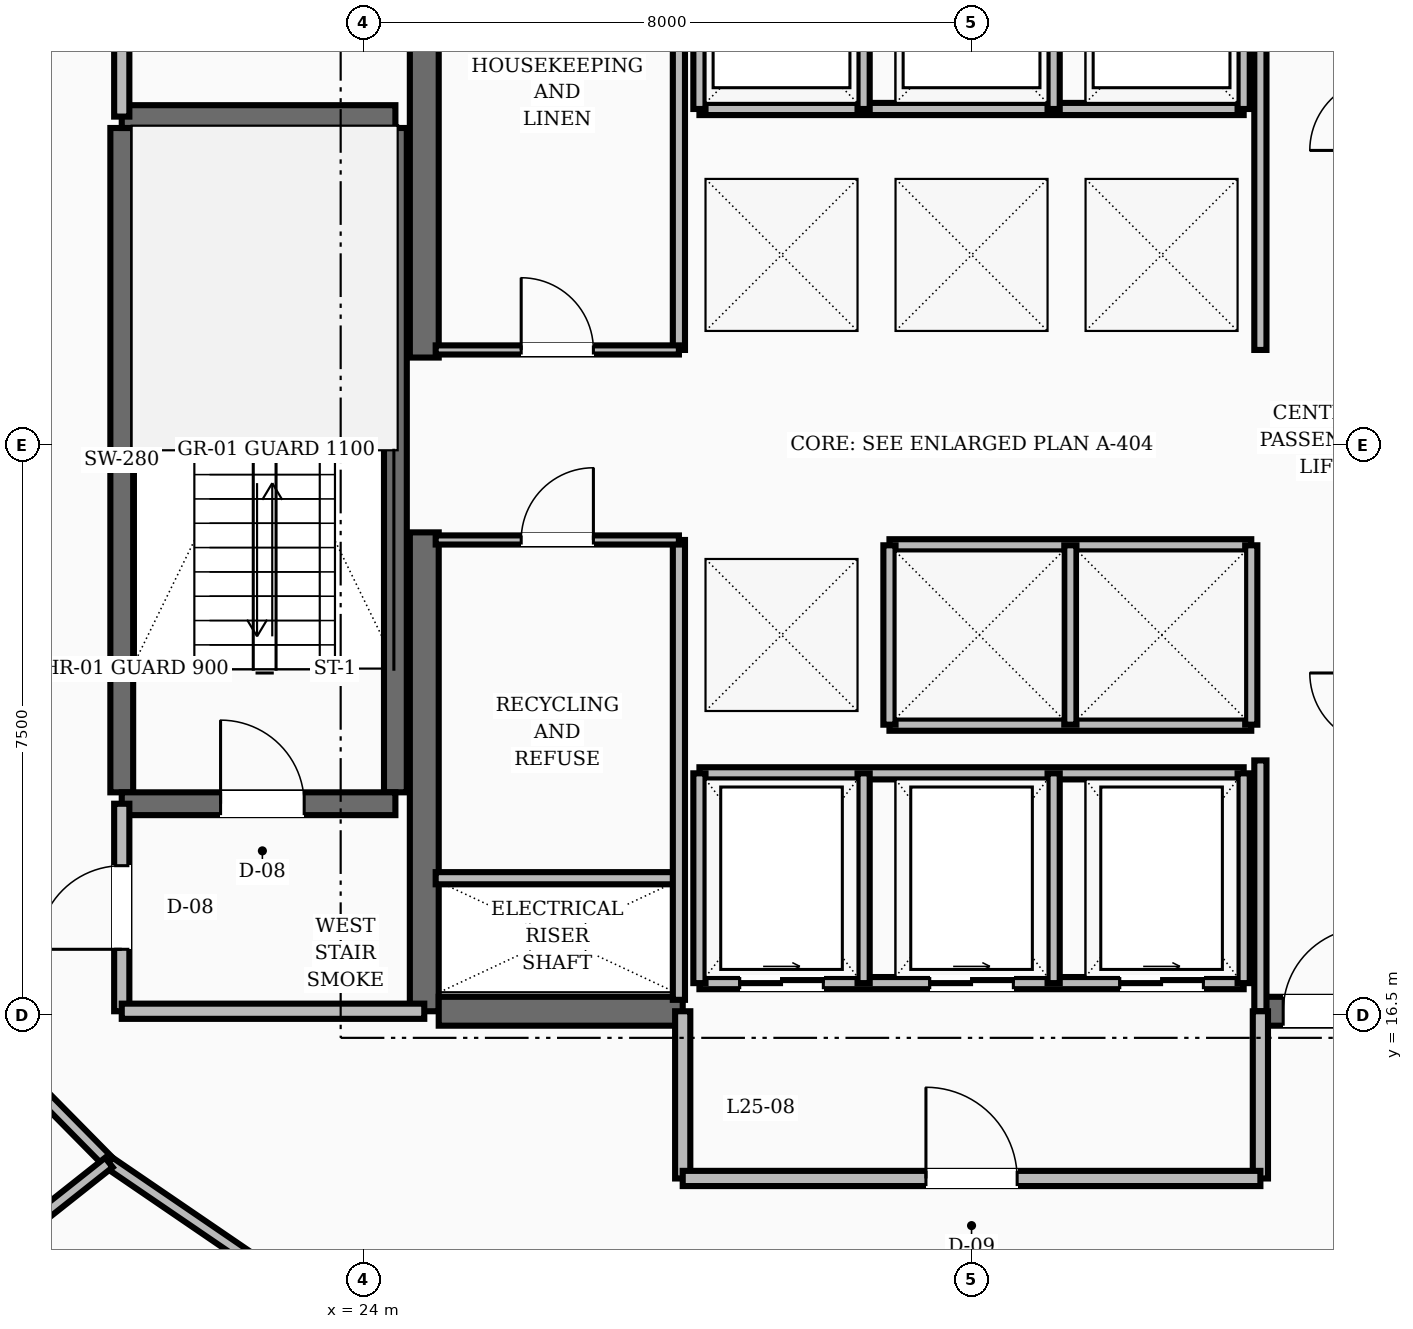
"""IFC4 building model, lengths in metres.
Left out: names, types, materials, properties, quantities, classifications, styles, units other than length and angle.
Written with IfcOpenShell. Run it as: python <this file> out.ifc"""

import sys

from ifc_helpers import new_model, si_unit, direction, frame, frame_2d, origin, place, context, subcontext, project, spatial, rectangle, extrude, element, fill, save


model = new_model("IFC4")
c1 = context("Model", 3, precision=1e-05, world=origin(), true_north=direction((0.0, 1.0)))
c2 = subcontext(c1, "Body", "Model", "MODEL_VIEW")
j1 = project(units=[si_unit("LENGTHUNIT", "METRE"), si_unit("PLANEANGLEUNIT", "RADIAN")], contexts=[c1])
p1 = place(None, origin())
s1 = spatial("IfcSite", under=j1, at=p1, CompositionType="ELEMENT")
p2 = place(p1, origin())
s2 = spatial("IfcBuilding", under=s1, at=p2, CompositionType="ELEMENT")
p3 = place(p2, frame((0.0, 0.0, 98.8)))
s3 = spatial("IfcBuildingStorey", under=s2, at=p3, CompositionType="ELEMENT", Elevation=98.8)
for number, where, z_axis, x_axis in (
    (1, (24.8, 16.55, 0.0), (0.0, 0.0, 1.0), (0.0, 1.0, 0.0)),
    (2, (24.8, 25.15, 0.0), (0.0, 0.0, 1.0), (0.0, 1.0, 0.0)),
):
    element("IfcWall", number, at=place(p3, frame(where, z_axis=z_axis, x_axis=x_axis)), inside=s3, PredefinedType="SHEAR", context=c2, shape_type="SweptSolid", body=[
        extrude(rectangle(XDim=6.3, YDim=0.38, at=frame_2d((3.15, 0.0))), origin(), (0.0, 0.0, 1.0), 3.6),
    ])
p4 = place(p3, frame((24.99, 16.55, 0.0), z_axis=(0.0, 0.0, 1.0), x_axis=(1.0, 0.0, 0.0)))
e3 = element("IfcWall", 3, at=p4, inside=s3, PredefinedType="SHEAR", context=c2, shape_type="SweptSolid", body=[
    extrude(rectangle(XDim=3.21, YDim=0.38, at=frame_2d((1.605, 0.0))), origin(), (0.0, 0.0, 1.0), 3.6),
])
p5 = place(p3, frame((35.8, 16.55, 0.0), z_axis=(0.0, 0.0, 1.0), x_axis=(1.0, 0.0, 0.0)))
e4 = element("IfcWall", 4, at=p5, inside=s3, PredefinedType="SHEAR", context=c2, shape_type="SweptSolid", body=[
    extrude(rectangle(XDim=3.21, YDim=0.38, at=frame_2d((1.605, 0.0))), origin(), (0.0, 0.0, 1.0), 3.6),
])
p6 = place(p5, frame((0.3, 0.0, 0.0)))
e5 = element("IfcOpeningElement", 5, at=p6, cuts=e4, PredefinedType="OPENING", context=c2, shape_type="SweptSolid", body=[
    extrude(rectangle(XDim=1.1, YDim=2.1, at=frame_2d((0.55, 1.05))), frame((0.0, 0.2, 0.0), z_axis=(0.0, -1.0, 0.0), x_axis=(1.0, 0.0, 0.0)), (0.0, 0.0, 1.0), 0.4),
])
for number, where, z_axis, x_axis in (
    (6, (20.82, 19.43, 0.0), (0.0, 0.0, 1.0), (0.0, 1.0, 0.0)),
    (7, (24.42, 19.43, 0.0), (0.0, 0.0, 1.0), (0.0, 1.0, 0.0)),
):
    element("IfcWall", number, at=place(p3, frame(where, z_axis=z_axis, x_axis=x_axis)), inside=s3, PredefinedType="SHEAR", context=c2, shape_type="SweptSolid", body=[
        extrude(rectangle(XDim=8.74, YDim=0.3, at=frame_2d((4.37, 0.0))), origin(), (0.0, 0.0, 1.0), 3.6),
    ])
p7 = place(p3, frame((20.82, 19.28, 0.0), z_axis=(0.0, 0.0, 1.0), x_axis=(1.0, 0.0, 0.0)))
e8 = element("IfcWall", 8, at=p7, inside=s3, PredefinedType="SHEAR", context=c2, shape_type="SweptSolid", body=[
    extrude(rectangle(XDim=3.6, YDim=0.3, at=frame_2d((1.8, 0.0))), origin(), (0.0, 0.0, 1.0), 3.6),
])
p8 = place(p7, frame((1.3, 0.0, 0.0)))
e9 = element("IfcOpeningElement", 9, at=p8, cuts=e8, PredefinedType="OPENING", context=c2, shape_type="SweptSolid", body=[
    extrude(rectangle(XDim=1.1, YDim=2.1, at=frame_2d((0.55, 1.05))), frame((0.0, 0.16, 0.0), z_axis=(0.0, -1.0, 0.0), x_axis=(1.0, 0.0, 0.0)), (0.0, 0.0, 1.0), 0.32),
])
p9 = place(p3, frame((20.82, 28.32, 0.0), z_axis=(0.0, 0.0, 1.0), x_axis=(1.0, 0.0, 0.0)))
e10 = element("IfcWall", 10, at=p9, inside=s3, PredefinedType="SHEAR", context=c2, shape_type="SweptSolid", body=[
    extrude(rectangle(XDim=3.6, YDim=0.3, at=frame_2d((1.8, 0.0))), origin(), (0.0, 0.0, 1.0), 3.6),
])
p10 = place(p3, frame((20.82, 16.55, 0.0), z_axis=(0.0, 0.0, 1.0), x_axis=(0.0, 1.0, 0.0)))
e11 = element("IfcWall", 11, at=p10, inside=s3, PredefinedType="SOLIDWALL", context=c2, shape_type="SweptSolid", body=[
    extrude(rectangle(XDim=2.73, YDim=0.2, at=frame_2d((1.365, 0.0))), origin(), (0.0, 0.0, 1.0), 2.71),
])
p11 = place(p10, frame((0.815, 0.0, 0.0)))
e12 = element("IfcOpeningElement", 12, at=p11, cuts=e11, PredefinedType="OPENING", context=c2, shape_type="SweptSolid", body=[
    extrude(rectangle(XDim=1.1, YDim=2.1, at=frame_2d((0.55, 1.05))), frame((0.0, 0.11, 0.0), z_axis=(0.0, -1.0, 0.0), x_axis=(1.0, 0.0, 0.0)), (0.0, 0.0, 1.0), 0.22),
])
p12 = place(p3, frame((20.82, 16.55, 0.0), z_axis=(0.0, 0.0, 1.0), x_axis=(1.0, 0.0, 0.0)))
e13 = element("IfcWall", 13, at=p12, inside=s3, PredefinedType="SOLIDWALL", context=c2, shape_type="SweptSolid", body=[
    extrude(rectangle(XDim=3.98, YDim=0.2, at=frame_2d((1.99, 0.0))), origin(), (0.0, 0.0, 1.0), 2.71),
])
p13 = place(p3, frame((20.82, 28.32, 0.0), z_axis=(0.0, 0.0, 1.0), x_axis=(0.0, 1.0, 0.0)))
e14 = element("IfcWall", 14, at=p13, inside=s3, PredefinedType="SOLIDWALL", context=c2, shape_type="SweptSolid", body=[
    extrude(rectangle(XDim=3.13, YDim=0.2, at=frame_2d((1.565, 0.0))), origin(), (0.0, 0.0, 1.0), 2.71),
])
p14 = place(p13, frame((1.09, 0.0, 0.0)))
e15 = element("IfcOpeningElement", 15, at=p14, cuts=e14, PredefinedType="OPENING", context=c2, shape_type="SweptSolid", body=[
    extrude(rectangle(XDim=0.95, YDim=2.1, at=frame_2d((0.475, 1.05))), frame((0.0, 0.11, 0.0), z_axis=(0.0, -1.0, 0.0), x_axis=(1.0, 0.0, 0.0)), (0.0, 0.0, 1.0), 0.22),
])
p15 = place(p3, frame((35.8, 16.55, 0.0), z_axis=(0.0, 0.0, 1.0), x_axis=(0.0, 1.0, 0.0)))
e16 = element("IfcWall", 16, at=p15, inside=s3, PredefinedType="SOLIDWALL", context=c2, shape_type="SweptSolid", body=[
    extrude(rectangle(XDim=3.3, YDim=0.16, at=frame_2d((1.65, 0.0))), origin(), (0.0, 0.0, 1.0), 2.71),
])
p16 = place(p3, frame((35.8, 25.25, 0.0), z_axis=(0.0, 0.0, 1.0), x_axis=(0.0, 1.0, 0.0)))
e17 = element("IfcWall", 17, at=p16, inside=s3, PredefinedType="SOLIDWALL", context=c2, shape_type="SweptSolid", body=[
    extrude(rectangle(XDim=6.2, YDim=0.16, at=frame_2d((3.1, 0.0))), origin(), (0.0, 0.0, 1.0), 2.71),
])
for number, where, z_axis, x_axis in (
    (18, (28.2, 14.35, 0.0), (0.0, 0.0, 1.0), (0.0, 1.0, 0.0)),
    (19, (35.8, 14.35, 0.0), (0.0, 0.0, 1.0), (0.0, 1.0, 0.0)),
):
    element("IfcWall", number, at=place(p3, frame(where, z_axis=z_axis, x_axis=x_axis)), inside=s3, PredefinedType="SOLIDWALL", context=c2, shape_type="SweptSolid", body=[
        extrude(rectangle(XDim=2.2, YDim=0.2, at=frame_2d((1.1, 0.0))), origin(), (0.0, 0.0, 1.0), 2.71),
    ])
p17 = place(p3, frame((28.2, 14.35, 0.0), z_axis=(0.0, 0.0, 1.0), x_axis=(1.0, 0.0, 0.0)))
e20 = element("IfcWall", 20, at=p17, inside=s3, PredefinedType="SOLIDWALL", context=c2, shape_type="SweptSolid", body=[
    extrude(rectangle(XDim=7.6, YDim=0.2, at=frame_2d((3.8, 0.0))), origin(), (0.0, 0.0, 1.0), 2.71),
])
p18 = place(p17, frame((3.2, 0.0, 0.0)))
e21 = element("IfcOpeningElement", 21, at=p18, cuts=e20, PredefinedType="OPENING", context=c2, shape_type="SweptSolid", body=[
    extrude(rectangle(XDim=1.2, YDim=2.1, at=frame_2d((0.6, 1.05))), frame((0.0, 0.11, 0.0), z_axis=(0.0, -1.0, 0.0), x_axis=(1.0, 0.0, 0.0)), (0.0, 0.0, 1.0), 0.22),
])
p19 = place(p3, frame((28.42, 28.42, 0.0), z_axis=(0.0, 0.0, 1.0), x_axis=(1.0, 0.0, 0.0)))
e22 = element("IfcWall", 22, at=p19, inside=s3, PredefinedType="SOLIDWALL", context=c2, shape_type="SweptSolid", body=[
    extrude(rectangle(XDim=7.16, YDim=0.16, at=frame_2d((3.58, 0.0))), origin(), (0.0, 0.0, 1.0), 2.71),
])
for number, where, z_axis, x_axis in (
    (23, (28.42, 28.42, 0.0), (0.0, 0.0, 1.0), (0.0, 1.0, 0.0)),
    (24, (30.58, 28.42, 0.0), (0.0, 0.0, 1.0), (0.0, 1.0, 0.0)),
    (25, (33.08, 28.42, 0.0), (0.0, 0.0, 1.0), (0.0, 1.0, 0.0)),
    (26, (35.58, 28.42, 0.0), (0.0, 0.0, 1.0), (0.0, 1.0, 0.0)),
):
    element("IfcWall", number, at=place(p3, frame(where, z_axis=z_axis, x_axis=x_axis)), inside=s3, PredefinedType="SOLIDWALL", context=c2, shape_type="SweptSolid", body=[
        extrude(rectangle(XDim=2.16, YDim=0.16, at=frame_2d((1.08, 0.0))), origin(), (0.0, 0.0, 1.0), 2.71),
    ])
for number, where, z_axis, x_axis in (
    (27, (30.92, 22.68, 0.0), (0.0, 0.0, 1.0), (1.0, 0.0, 0.0)),
    (28, (30.92, 20.32, 0.0), (0.0, 0.0, 1.0), (1.0, 0.0, 0.0)),
):
    element("IfcWall", number, at=place(p3, frame(where, z_axis=z_axis, x_axis=x_axis)), inside=s3, PredefinedType="SOLIDWALL", context=c2, shape_type="SweptSolid", body=[
        extrude(rectangle(XDim=4.76, YDim=0.16, at=frame_2d((2.38, 0.0))), origin(), (0.0, 0.0, 1.0), 2.71),
    ])
for number, where, z_axis, x_axis in (
    (29, (30.92, 20.32, 0.0), (0.0, 0.0, 1.0), (0.0, 1.0, 0.0)),
    (30, (33.3, 20.32, 0.0), (0.0, 0.0, 1.0), (0.0, 1.0, 0.0)),
    (31, (35.68, 20.32, 0.0), (0.0, 0.0, 1.0), (0.0, 1.0, 0.0)),
):
    element("IfcWall", number, at=place(p3, frame(where, z_axis=z_axis, x_axis=x_axis)), inside=s3, PredefinedType="SOLIDWALL", context=c2, shape_type="SweptSolid", body=[
        extrude(rectangle(XDim=2.36, YDim=0.16, at=frame_2d((1.18, 0.0))), origin(), (0.0, 0.0, 1.0), 2.71),
    ])
p20 = place(p3, frame((28.42, 16.92, 0.0), z_axis=(0.0, 0.0, 1.0), x_axis=(1.0, 0.0, 0.0)))
e32 = element("IfcWall", 32, at=p20, inside=s3, PredefinedType="SOLIDWALL", context=c2, shape_type="SweptSolid", body=[
    extrude(rectangle(XDim=7.16, YDim=0.16, at=frame_2d((3.58, 0.0))), origin(), (0.0, 0.0, 1.0), 2.71),
])
p21 = place(p20, frame((0.53, 0.0, 0.0)))
e33 = element("IfcOpeningElement", 33, at=p21, cuts=e32, PredefinedType="OPENING", context=c2, shape_type="SweptSolid", body=[
    extrude(rectangle(XDim=1.1, YDim=2.15, at=frame_2d((0.55, 1.075))), frame((0.0, 0.09, 0.0), z_axis=(0.0, -1.0, 0.0), x_axis=(1.0, 0.0, 0.0)), (0.0, 0.0, 1.0), 0.18),
])
p22 = place(p20, frame((3.03, 0.0, 0.0)))
e34 = element("IfcOpeningElement", 34, at=p22, cuts=e32, PredefinedType="OPENING", context=c2, shape_type="SweptSolid", body=[
    extrude(rectangle(XDim=1.1, YDim=2.15, at=frame_2d((0.55, 1.075))), frame((0.0, 0.09, 0.0), z_axis=(0.0, -1.0, 0.0), x_axis=(1.0, 0.0, 0.0)), (0.0, 0.0, 1.0), 0.18),
])
p23 = place(p20, frame((5.53, 0.0, 0.0)))
e35 = element("IfcOpeningElement", 35, at=p23, cuts=e32, PredefinedType="OPENING", context=c2, shape_type="SweptSolid", body=[
    extrude(rectangle(XDim=1.1, YDim=2.15, at=frame_2d((0.55, 1.075))), frame((0.0, 0.09, 0.0), z_axis=(0.0, -1.0, 0.0), x_axis=(1.0, 0.0, 0.0)), (0.0, 0.0, 1.0), 0.18),
])
p24 = place(p3, frame((28.42, 19.68, 0.0), z_axis=(0.0, 0.0, 1.0), x_axis=(1.0, 0.0, 0.0)))
e36 = element("IfcWall", 36, at=p24, inside=s3, PredefinedType="SOLIDWALL", context=c2, shape_type="SweptSolid", body=[
    extrude(rectangle(XDim=7.16, YDim=0.16, at=frame_2d((3.58, 0.0))), origin(), (0.0, 0.0, 1.0), 2.71),
])
for number, where, z_axis, x_axis in (
    (37, (28.42, 16.92, 0.0), (0.0, 0.0, 1.0), (0.0, 1.0, 0.0)),
    (38, (30.58, 16.92, 0.0), (0.0, 0.0, 1.0), (0.0, 1.0, 0.0)),
    (39, (33.08, 16.92, 0.0), (0.0, 0.0, 1.0), (0.0, 1.0, 0.0)),
    (40, (35.58, 16.92, 0.0), (0.0, 0.0, 1.0), (0.0, 1.0, 0.0)),
):
    element("IfcWall", number, at=place(p3, frame(where, z_axis=z_axis, x_axis=x_axis)), inside=s3, PredefinedType="SOLIDWALL", context=c2, shape_type="SweptSolid", body=[
        extrude(rectangle(XDim=2.76, YDim=0.16, at=frame_2d((1.38, 0.0))), origin(), (0.0, 0.0, 1.0), 2.71),
    ])
p25 = place(p3, frame((24.95, 18.3, 0.0), z_axis=(0.0, 0.0, 1.0), x_axis=(1.0, 0.0, 0.0)))
e41 = element("IfcWall", 41, at=p25, inside=s3, PredefinedType="SOLIDWALL", context=c2, shape_type="SweptSolid", body=[
    extrude(rectangle(XDim=3.2, YDim=0.16, at=frame_2d((1.6, 0.0))), origin(), (0.0, 0.0, 1.0), 2.71),
])
p26 = place(p3, frame((28.15, 16.7, 0.0), z_axis=(0.0, 0.0, 1.0), x_axis=(0.0, 1.0, 0.0)))
e42 = element("IfcWall", 42, at=p26, inside=s3, PredefinedType="SOLIDWALL", context=c2, shape_type="SweptSolid", body=[
    extrude(rectangle(XDim=6.05, YDim=0.16, at=frame_2d((3.025, 0.0))), origin(), (0.0, 0.0, 1.0), 2.71),
])
p27 = place(p3, frame((28.15, 25.25, 0.0), z_axis=(0.0, 0.0, 1.0), x_axis=(0.0, 1.0, 0.0)))
e43 = element("IfcWall", 43, at=p27, inside=s3, PredefinedType="SOLIDWALL", context=c2, shape_type="SweptSolid", body=[
    extrude(rectangle(XDim=6.1, YDim=0.16, at=frame_2d((3.05, 0.0))), origin(), (0.0, 0.0, 1.0), 2.71),
])
p28 = place(p3, frame((24.95, 25.25, 0.0), z_axis=(0.0, 0.0, 1.0), x_axis=(1.0, 0.0, 0.0)))
e44 = element("IfcWall", 44, at=p28, inside=s3, PredefinedType="PARTITIONING", context=c2, shape_type="SweptSolid", body=[
    extrude(rectangle(XDim=3.2, YDim=0.12, at=frame_2d((1.6, 0.0))), origin(), (0.0, 0.0, 1.0), 2.71),
])
p29 = place(p28, frame((1.125, 0.0, 0.0)))
e45 = element("IfcOpeningElement", 45, at=p29, cuts=e44, PredefinedType="OPENING", context=c2, shape_type="SweptSolid", body=[
    extrude(rectangle(XDim=0.95, YDim=2.1, at=frame_2d((0.475, 1.05))), frame((0.0, 0.07, 0.0), z_axis=(0.0, -1.0, 0.0), x_axis=(1.0, 0.0, 0.0)), (0.0, 0.0, 1.0), 0.14),
])
p30 = place(p3, frame((24.95, 22.75, 0.0), z_axis=(0.0, 0.0, 1.0), x_axis=(1.0, 0.0, 0.0)))
e46 = element("IfcWall", 46, at=p30, inside=s3, PredefinedType="PARTITIONING", context=c2, shape_type="SweptSolid", body=[
    extrude(rectangle(XDim=3.2, YDim=0.12, at=frame_2d((1.6, 0.0))), origin(), (0.0, 0.0, 1.0), 2.71),
])
p31 = place(p30, frame((1.125, 0.0, 0.0)))
e47 = element("IfcOpeningElement", 47, at=p31, cuts=e46, PredefinedType="OPENING", context=c2, shape_type="SweptSolid", body=[
    extrude(rectangle(XDim=0.95, YDim=2.1, at=frame_2d((0.475, 1.05))), frame((0.0, 0.07, 0.0), z_axis=(0.0, -1.0, 0.0), x_axis=(1.0, 0.0, 0.0)), (0.0, 0.0, 1.0), 0.14),
])
p32 = place(p3, frame((18.655, 16.583, 0.0), z_axis=(0.0, 0.0, 1.0), x_axis=(0.702366174226, -0.711815816981, 0.0)))
e48 = element("IfcWall", 48, at=p32, inside=s3, PredefinedType="SOLIDWALL", context=c2, shape_type="SweptSolid", body=[
    extrude(rectangle(XDim=2.842, YDim=0.16, at=frame_2d((1.421, 0.0))), origin(), (0.0, 0.0, 1.0), 2.71),
])
p33 = place(p3, frame((20.651, 14.56, 0.0), z_axis=(0.0, 0.0, 1.0), x_axis=(0.825929039072, -0.563774088104, 0.0)))
e49 = element("IfcWall", 49, at=p33, inside=s3, PredefinedType="SOLIDWALL", context=c2, shape_type="SweptSolid", body=[
    extrude(rectangle(XDim=2.945, YDim=0.16, at=frame_2d((1.472, 0.0))), origin(), (0.0, 0.0, 1.0), 2.71),
])
p34 = place(p3, frame((20.651, 14.56, 0.0), z_axis=(0.0, 0.0, 1.0), x_axis=(-0.783943059449, -0.620832730727, 0.0)))
e50 = element("IfcWall", 50, at=p34, inside=s3, PredefinedType="SOLIDWALL", context=c2, shape_type="SweptSolid", body=[
    extrude(rectangle(XDim=9.732, YDim=0.16, at=frame_2d((4.866, 0.0))), origin(), (0.0, 0.0, 1.0), 2.71),
])
p35 = place(p8, origin())
e51 = element("IfcDoor", 51, at=p35, inside=s3, OperationType="SINGLE_SWING_LEFT", PredefinedType="DOOR", context=c2, shape_type="SweptSolid", body=[
    extrude(rectangle(XDim=1.1, YDim=2.1, at=frame_2d((0.55, 1.05))), frame((0.0, 0.025, 0.0), z_axis=(0.0, -1.0, 0.0), x_axis=(1.0, 0.0, 0.0)), (0.0, 0.0, 1.0), 0.05),
])
fill(e9, e51)
p36 = place(p11, origin())
e52 = element("IfcDoor", 52, at=p36, inside=s3, OperationType="SINGLE_SWING_LEFT", PredefinedType="DOOR", context=c2, shape_type="SweptSolid", body=[
    extrude(rectangle(XDim=1.1, YDim=2.1, at=frame_2d((0.55, 1.05))), frame((0.0, 0.025, 0.0), z_axis=(0.0, -1.0, 0.0), x_axis=(1.0, 0.0, 0.0)), (0.0, 0.0, 1.0), 0.05),
])
fill(e12, e52)
p37 = place(p6, origin())
e53 = element("IfcDoor", 53, at=p37, inside=s3, OperationType="SINGLE_SWING_RIGHT", PredefinedType="DOOR", context=c2, shape_type="SweptSolid", body=[
    extrude(rectangle(XDim=1.1, YDim=2.1, at=frame_2d((0.55, 1.05))), frame((0.0, 0.025, 0.0), z_axis=(0.0, -1.0, 0.0), x_axis=(1.0, 0.0, 0.0)), (0.0, 0.0, 1.0), 0.05),
])
fill(e5, e53)
p38 = place(p18, origin())
e54 = element("IfcDoor", 54, at=p38, inside=s3, OperationType="SINGLE_SWING_LEFT", PredefinedType="DOOR", context=c2, shape_type="SweptSolid", body=[
    extrude(rectangle(XDim=1.2, YDim=2.1, at=frame_2d((0.6, 1.05))), frame((0.0, 0.025, 0.0), z_axis=(0.0, -1.0, 0.0), x_axis=(1.0, 0.0, 0.0)), (0.0, 0.0, 1.0), 0.05),
])
fill(e21, e54)
p39 = place(p21, origin())
e55 = element("IfcDoor", 55, at=p39, inside=s3, OperationType="SLIDING_TO_RIGHT", PredefinedType="DOOR", context=c2, shape_type="SweptSolid", body=[
    extrude(rectangle(XDim=1.1, YDim=2.15, at=frame_2d((0.55, 1.075))), frame((0.0, 0.025, 0.0), z_axis=(0.0, -1.0, 0.0), x_axis=(1.0, 0.0, 0.0)), (0.0, 0.0, 1.0), 0.05),
])
fill(e33, e55)
p40 = place(p22, origin())
e56 = element("IfcDoor", 56, at=p40, inside=s3, OperationType="SLIDING_TO_RIGHT", PredefinedType="DOOR", context=c2, shape_type="SweptSolid", body=[
    extrude(rectangle(XDim=1.1, YDim=2.15, at=frame_2d((0.55, 1.075))), frame((0.0, 0.025, 0.0), z_axis=(0.0, -1.0, 0.0), x_axis=(1.0, 0.0, 0.0)), (0.0, 0.0, 1.0), 0.05),
])
fill(e34, e56)
p41 = place(p23, origin())
e57 = element("IfcDoor", 57, at=p41, inside=s3, OperationType="SLIDING_TO_RIGHT", PredefinedType="DOOR", context=c2, shape_type="SweptSolid", body=[
    extrude(rectangle(XDim=1.1, YDim=2.15, at=frame_2d((0.55, 1.075))), frame((0.0, 0.025, 0.0), z_axis=(0.0, -1.0, 0.0), x_axis=(1.0, 0.0, 0.0)), (0.0, 0.0, 1.0), 0.05),
])
fill(e35, e57)
p42 = place(p29, origin())
e58 = element("IfcDoor", 58, at=p42, inside=s3, OperationType="SINGLE_SWING_LEFT", PredefinedType="DOOR", context=c2, shape_type="SweptSolid", body=[
    extrude(rectangle(XDim=0.95, YDim=2.1, at=frame_2d((0.475, 1.05))), frame((0.0, 0.025, 0.0), z_axis=(0.0, -1.0, 0.0), x_axis=(1.0, 0.0, 0.0)), (0.0, 0.0, 1.0), 0.05),
])
fill(e45, e58)
p43 = place(p31, origin())
e59 = element("IfcDoor", 59, at=p43, inside=s3, OperationType="SINGLE_SWING_RIGHT", PredefinedType="DOOR", context=c2, shape_type="SweptSolid", body=[
    extrude(rectangle(XDim=0.95, YDim=2.1, at=frame_2d((0.475, 1.05))), frame((0.0, 0.025, 0.0), z_axis=(0.0, -1.0, 0.0), x_axis=(1.0, 0.0, 0.0)), (0.0, 0.0, 1.0), 0.05),
])
fill(e47, e59)
save(model, sys.argv[1])
